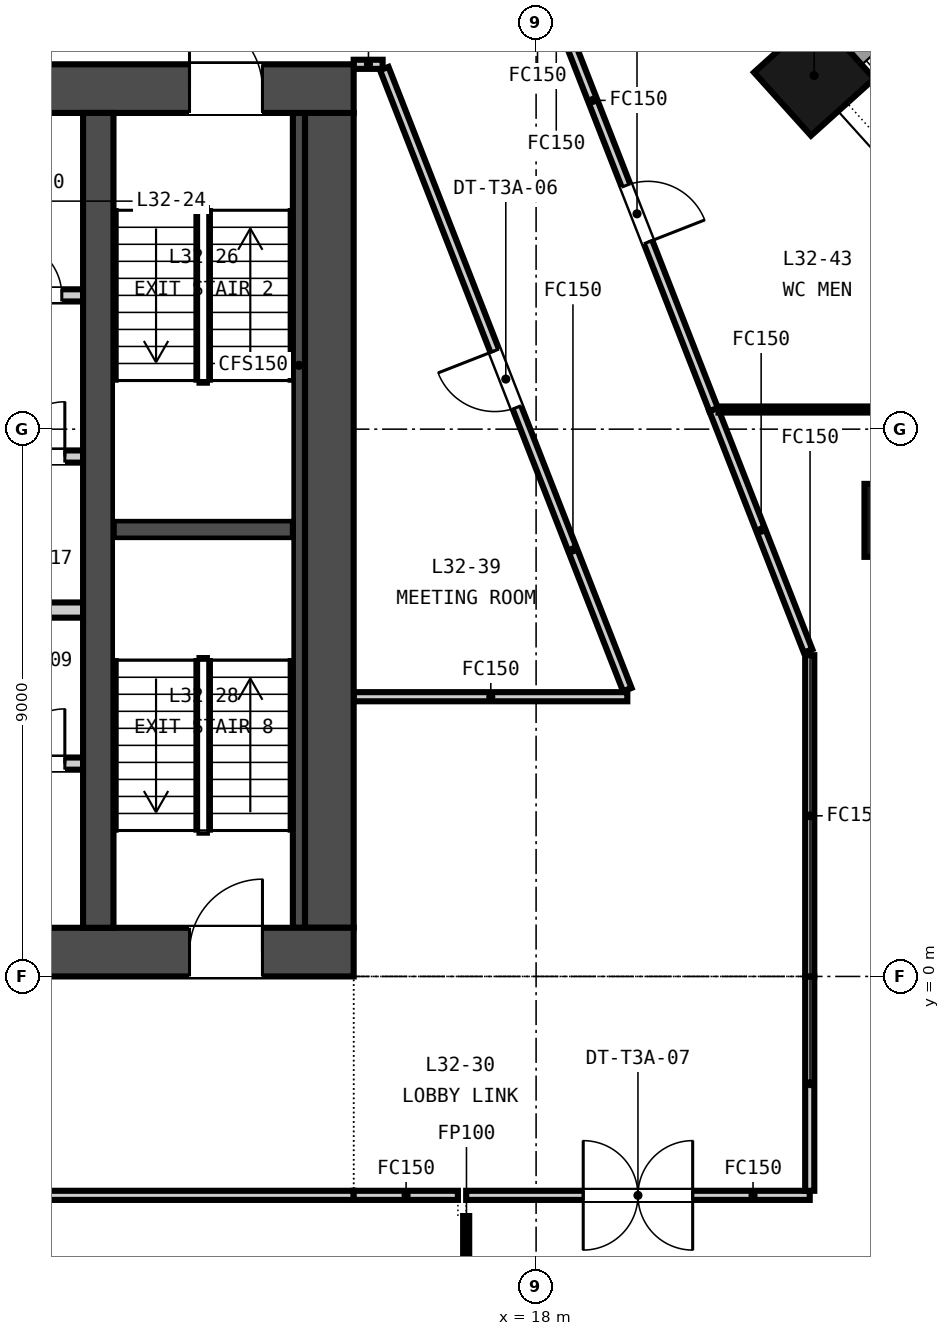
"""IFC4 building model, lengths in metres.
Left out: names, types, materials, properties, quantities, classifications, styles, units other than length and angle.
Written with IfcOpenShell. Run it as: python <this file> out.ifc"""

import sys

from ifc_helpers import new_model, si_unit, direction, frame, frame_2d, origin, origin_2d, place, context, subcontext, project, spatial, rectangle, extrude, element, fill, save


model = new_model("IFC4")
c1 = context("Model", 3, precision=1e-05, world=origin(), true_north=direction((0.0, 1.0)))
c2 = subcontext(c1, "Body", "Model", "MODEL_VIEW")
j1 = project(units=[si_unit("LENGTHUNIT", "METRE"), si_unit("PLANEANGLEUNIT", "RADIAN")], contexts=[c1])
p1 = place(None, origin())
s1 = spatial("IfcSite", under=j1, at=p1, CompositionType="ELEMENT")
p2 = place(p1, origin())
s2 = spatial("IfcBuilding", under=s1, at=p2, CompositionType="ELEMENT")
p3 = place(p2, frame((0.0, 0.0, 133.45)))
s3 = spatial("IfcBuildingStorey", under=s2, at=p3, CompositionType="ELEMENT", Elevation=133.45)
p4 = place(p3, frame((-15.0, 0.4, -0.15), z_axis=(0.0, 0.0, 1.0), x_axis=(1.0, 0.0, 0.0)))
e1 = element("IfcWall", 1, at=p4, inside=s3, PredefinedType="SOLIDWALL", context=c2, shape_type="SweptSolid", body=[
    extrude(rectangle(XDim=30.0, YDim=0.8, at=frame_2d((15.0, 0.0))), origin(), (0.0, 0.0, 1.0), 3.65),
])
p5 = place(p4, frame((5.8, 0.0, 0.15)))
e2 = element("IfcOpeningElement", 2, at=p5, cuts=e1, PredefinedType="OPENING", context=c2, shape_type="SweptSolid", body=[
    extrude(rectangle(XDim=2.4, YDim=2.4, at=frame_2d((1.2, 1.2))), frame((0.0, 0.41, 0.0), z_axis=(0.0, -1.0, 0.0), x_axis=(1.0, 0.0, 0.0)), (0.0, 0.0, 1.0), 0.82),
])
p6 = place(p4, frame((13.8, 0.0, 0.15)))
e3 = element("IfcOpeningElement", 3, at=p6, cuts=e1, PredefinedType="OPENING", context=c2, shape_type="SweptSolid", body=[
    extrude(rectangle(XDim=2.4, YDim=2.4, at=frame_2d((1.2, 1.2))), frame((0.0, 0.41, 0.0), z_axis=(0.0, -1.0, 0.0), x_axis=(1.0, 0.0, 0.0)), (0.0, 0.0, 1.0), 0.82),
])
p7 = place(p4, frame((21.8, 0.0, 0.15)))
e4 = element("IfcOpeningElement", 4, at=p7, cuts=e1, PredefinedType="OPENING", context=c2, shape_type="SweptSolid", body=[
    extrude(rectangle(XDim=2.4, YDim=2.4, at=frame_2d((1.2, 1.2))), frame((0.0, 0.41, 0.0), z_axis=(0.0, -1.0, 0.0), x_axis=(1.0, 0.0, 0.0)), (0.0, 0.0, 1.0), 0.82),
])
p8 = place(p4, frame((1.5, 0.0, 0.15)))
e5 = element("IfcOpeningElement", 5, at=p8, cuts=e1, PredefinedType="OPENING", context=c2, shape_type="SweptSolid", body=[
    extrude(rectangle(XDim=1.2, YDim=2.1, at=frame_2d((0.6, 1.05))), frame((0.0, 0.41, 0.0), z_axis=(0.0, -1.0, 0.0), x_axis=(1.0, 0.0, 0.0)), (0.0, 0.0, 1.0), 0.82),
])
p9 = place(p4, frame((27.3, 0.0, 0.15)))
e6 = element("IfcOpeningElement", 6, at=p9, cuts=e1, PredefinedType="OPENING", context=c2, shape_type="SweptSolid", body=[
    extrude(rectangle(XDim=1.2, YDim=2.1, at=frame_2d((0.6, 1.05))), frame((0.0, 0.41, 0.0), z_axis=(0.0, -1.0, 0.0), x_axis=(1.0, 0.0, 0.0)), (0.0, 0.0, 1.0), 0.82),
])
p10 = place(p3, frame((-15.0, 14.6, -0.15), z_axis=(0.0, 0.0, 1.0), x_axis=(1.0, 0.0, 0.0)))
e7 = element("IfcWall", 7, at=p10, inside=s3, PredefinedType="SOLIDWALL", context=c2, shape_type="SweptSolid", body=[
    extrude(rectangle(XDim=30.0, YDim=0.8, at=frame_2d((15.0, 0.0))), origin(), (0.0, 0.0, 1.0), 3.65),
])
p11 = place(p10, frame((9.25, 0.0, 0.15)))
e8 = element("IfcOpeningElement", 8, at=p11, cuts=e7, PredefinedType="OPENING", context=c2, shape_type="SweptSolid", body=[
    extrude(rectangle(XDim=1.5, YDim=2.1, at=frame_2d((0.75, 1.05))), frame((0.0, 0.41, 0.0), z_axis=(0.0, -1.0, 0.0), x_axis=(1.0, 0.0, 0.0)), (0.0, 0.0, 1.0), 0.82),
])
p12 = place(p10, frame((19.4, 0.0, 0.15)))
e9 = element("IfcOpeningElement", 9, at=p12, cuts=e7, PredefinedType="OPENING", context=c2, shape_type="SweptSolid", body=[
    extrude(rectangle(XDim=1.5, YDim=2.1, at=frame_2d((0.75, 1.05))), frame((0.0, 0.41, 0.0), z_axis=(0.0, -1.0, 0.0), x_axis=(1.0, 0.0, 0.0)), (0.0, 0.0, 1.0), 0.82),
])
p13 = place(p10, frame((1.5, 0.0, 0.15)))
e10 = element("IfcOpeningElement", 10, at=p13, cuts=e7, PredefinedType="OPENING", context=c2, shape_type="SweptSolid", body=[
    extrude(rectangle(XDim=1.2, YDim=2.1, at=frame_2d((0.6, 1.05))), frame((0.0, 0.41, 0.0), z_axis=(0.0, -1.0, 0.0), x_axis=(1.0, 0.0, 0.0)), (0.0, 0.0, 1.0), 0.82),
])
p14 = place(p10, frame((27.3, 0.0, 0.15)))
e11 = element("IfcOpeningElement", 11, at=p14, cuts=e7, PredefinedType="OPENING", context=c2, shape_type="SweptSolid", body=[
    extrude(rectangle(XDim=1.2, YDim=2.1, at=frame_2d((0.6, 1.05))), frame((0.0, 0.41, 0.0), z_axis=(0.0, -1.0, 0.0), x_axis=(1.0, 0.0, 0.0)), (0.0, 0.0, 1.0), 0.82),
])
p15 = place(p3, frame((14.6, 0.8, -0.15), z_axis=(0.0, 0.0, 1.0), x_axis=(0.0, 1.0, 0.0)))
e12 = element("IfcWall", 12, at=p15, inside=s3, PredefinedType="SOLIDWALL", context=c2, shape_type="SweptSolid", body=[
    extrude(rectangle(XDim=13.4, YDim=0.8, at=frame_2d((6.7, 0.0))), origin(), (0.0, 0.0, 1.0), 3.65),
])
p16 = place(p3, frame((10.8, 0.8, -0.15), z_axis=(0.0, 0.0, 1.0), x_axis=(0.0, 1.0, 0.0)))
e13 = element("IfcWall", 13, at=p16, inside=s3, PredefinedType="SOLIDWALL", context=c2, shape_type="SweptSolid", body=[
    extrude(rectangle(XDim=13.4, YDim=0.5, at=frame_2d((6.7, 0.0))), origin(), (0.0, 0.0, 1.0), 3.65),
])
p17 = place(p3, frame((22.573, 14.816, -0.15), z_axis=(0.0, 0.0, 1.0), x_axis=(-0.669130606359, 0.743144825477, 0.0)))
e14 = element("IfcColumn", 14, at=p17, inside=s3, PredefinedType="COLUMN", context=c2, shape_type="SweptSolid", body=[
    extrude(rectangle(XDim=1.4, YDim=1.4, at=origin_2d()), origin(), (0.0, 0.0, 1.0), 3.65),
])
p18 = place(p3, frame((24.0, 7.5, -0.15), z_axis=(0.0, 0.0, 1.0), x_axis=(1.0, 0.0, 0.0)))
e15 = element("IfcColumn", 15, at=p18, inside=s3, PredefinedType="COLUMN", context=c2, shape_type="SweptSolid", body=[
    extrude(rectangle(XDim=1.2, YDim=1.2, at=origin_2d()), origin(), (0.0, 0.0, 1.0), 3.65),
])
p19 = place(p3, frame((-10.55, 3.5, 0.0), z_axis=(0.0, 0.0, 1.0), x_axis=(1.0, 0.0, 0.0)))
e16 = element("IfcWall", 16, at=p19, inside=s3, PredefinedType="PARTITIONING", context=c2, shape_type="SweptSolid", body=[
    extrude(rectangle(XDim=21.1, YDim=0.2, at=frame_2d((10.55, 0.0))), origin(), (0.0, 0.0, 1.0), 3.5),
])
p20 = place(p19, frame((2.312, 0.0, 0.0)))
e17 = element("IfcOpeningElement", 17, at=p20, cuts=e16, PredefinedType="OPENING", context=c2, shape_type="SweptSolid", body=[
    extrude(rectangle(XDim=1.0, YDim=2.1, at=frame_2d((0.5, 1.05))), frame((0.0, 0.11, 0.0), z_axis=(0.0, -1.0, 0.0), x_axis=(1.0, 0.0, 0.0)), (0.0, 0.0, 1.0), 0.22),
])
p21 = place(p19, frame((7.05, 0.0, 0.0)))
e18 = element("IfcOpeningElement", 18, at=p21, cuts=e16, PredefinedType="OPENING", context=c2, shape_type="SweptSolid", body=[
    extrude(rectangle(XDim=1.0, YDim=2.1, at=frame_2d((0.5, 1.05))), frame((0.0, 0.11, 0.0), z_axis=(0.0, -1.0, 0.0), x_axis=(1.0, 0.0, 0.0)), (0.0, 0.0, 1.0), 0.22),
])
p22 = place(p19, frame((10.175, 0.0, 0.0)))
e19 = element("IfcOpeningElement", 19, at=p22, cuts=e16, PredefinedType="OPENING", context=c2, shape_type="SweptSolid", body=[
    extrude(rectangle(XDim=1.0, YDim=2.1, at=frame_2d((0.5, 1.05))), frame((0.0, 0.11, 0.0), z_axis=(0.0, -1.0, 0.0), x_axis=(1.0, 0.0, 0.0)), (0.0, 0.0, 1.0), 0.22),
])
p23 = place(p19, frame((14.05, 0.0, 0.0)))
e20 = element("IfcOpeningElement", 20, at=p23, cuts=e16, PredefinedType="OPENING", context=c2, shape_type="SweptSolid", body=[
    extrude(rectangle(XDim=1.0, YDim=2.1, at=frame_2d((0.5, 1.05))), frame((0.0, 0.11, 0.0), z_axis=(0.0, -1.0, 0.0), x_axis=(1.0, 0.0, 0.0)), (0.0, 0.0, 1.0), 0.22),
])
p24 = place(p19, frame((17.837, 0.0, 0.0)))
e21 = element("IfcOpeningElement", 21, at=p24, cuts=e16, PredefinedType="OPENING", context=c2, shape_type="SweptSolid", body=[
    extrude(rectangle(XDim=0.9, YDim=2.1, at=frame_2d((0.45, 1.05))), frame((0.0, 0.11, 0.0), z_axis=(0.0, -1.0, 0.0), x_axis=(1.0, 0.0, 0.0)), (0.0, 0.0, 1.0), 0.22),
])
p25 = place(p19, frame((19.9, 0.0, 0.0)))
e22 = element("IfcOpeningElement", 22, at=p25, cuts=e16, PredefinedType="OPENING", context=c2, shape_type="SweptSolid", body=[
    extrude(rectangle(XDim=0.9, YDim=2.1, at=frame_2d((0.45, 1.05))), frame((0.0, 0.11, 0.0), z_axis=(0.0, -1.0, 0.0), x_axis=(1.0, 0.0, 0.0)), (0.0, 0.0, 1.0), 0.22),
])
p26 = place(p3, frame((-10.55, 6.025, 0.0), z_axis=(0.0, 0.0, 1.0), x_axis=(1.0, 0.0, 0.0)))
e23 = element("IfcWall", 23, at=p26, inside=s3, PredefinedType="PARTITIONING", context=c2, shape_type="SweptSolid", body=[
    extrude(rectangle(XDim=21.1, YDim=0.25, at=frame_2d((10.55, 0.0))), origin(), (0.0, 0.0, 1.0), 3.5),
])
p27 = place(p3, frame((-10.55, 8.55, 0.0), z_axis=(0.0, 0.0, 1.0), x_axis=(1.0, 0.0, 0.0)))
e24 = element("IfcWall", 24, at=p27, inside=s3, PredefinedType="PARTITIONING", context=c2, shape_type="SweptSolid", body=[
    extrude(rectangle(XDim=21.1, YDim=0.2, at=frame_2d((10.55, 0.0))), origin(), (0.0, 0.0, 1.0), 3.5),
])
p28 = place(p27, frame((0.675, 0.0, 0.0)))
e25 = element("IfcOpeningElement", 25, at=p28, cuts=e24, PredefinedType="OPENING", context=c2, shape_type="SweptSolid", body=[
    extrude(rectangle(XDim=1.2, YDim=2.1, at=frame_2d((0.6, 1.05))), frame((0.0, 0.11, 0.0), z_axis=(0.0, -1.0, 0.0), x_axis=(1.0, 0.0, 0.0)), (0.0, 0.0, 1.0), 0.22),
])
p29 = place(p27, frame((3.475, 0.0, 0.0)))
e26 = element("IfcOpeningElement", 26, at=p29, cuts=e24, PredefinedType="OPENING", context=c2, shape_type="SweptSolid", body=[
    extrude(rectangle(XDim=1.2, YDim=2.1, at=frame_2d((0.6, 1.05))), frame((0.0, 0.11, 0.0), z_axis=(0.0, -1.0, 0.0), x_axis=(1.0, 0.0, 0.0)), (0.0, 0.0, 1.0), 0.22),
])
p30 = place(p27, frame((6.275, 0.0, 0.0)))
e27 = element("IfcOpeningElement", 27, at=p30, cuts=e24, PredefinedType="OPENING", context=c2, shape_type="SweptSolid", body=[
    extrude(rectangle(XDim=1.2, YDim=2.1, at=frame_2d((0.6, 1.05))), frame((0.0, 0.11, 0.0), z_axis=(0.0, -1.0, 0.0), x_axis=(1.0, 0.0, 0.0)), (0.0, 0.0, 1.0), 0.22),
])
p31 = place(p27, frame((9.075, 0.0, 0.0)))
e28 = element("IfcOpeningElement", 28, at=p31, cuts=e24, PredefinedType="OPENING", context=c2, shape_type="SweptSolid", body=[
    extrude(rectangle(XDim=1.2, YDim=2.1, at=frame_2d((0.6, 1.05))), frame((0.0, 0.11, 0.0), z_axis=(0.0, -1.0, 0.0), x_axis=(1.0, 0.0, 0.0)), (0.0, 0.0, 1.0), 0.22),
])
p32 = place(p27, frame((11.875, 0.0, 0.0)))
e29 = element("IfcOpeningElement", 29, at=p32, cuts=e24, PredefinedType="OPENING", context=c2, shape_type="SweptSolid", body=[
    extrude(rectangle(XDim=1.2, YDim=2.1, at=frame_2d((0.6, 1.05))), frame((0.0, 0.11, 0.0), z_axis=(0.0, -1.0, 0.0), x_axis=(1.0, 0.0, 0.0)), (0.0, 0.0, 1.0), 0.22),
])
p33 = place(p27, frame((14.675, 0.0, 0.0)))
e30 = element("IfcOpeningElement", 30, at=p33, cuts=e24, PredefinedType="OPENING", context=c2, shape_type="SweptSolid", body=[
    extrude(rectangle(XDim=1.2, YDim=2.1, at=frame_2d((0.6, 1.05))), frame((0.0, 0.11, 0.0), z_axis=(0.0, -1.0, 0.0), x_axis=(1.0, 0.0, 0.0)), (0.0, 0.0, 1.0), 0.22),
])
p34 = place(p27, frame((17.475, 0.0, 0.0)))
e31 = element("IfcOpeningElement", 31, at=p34, cuts=e24, PredefinedType="OPENING", context=c2, shape_type="SweptSolid", body=[
    extrude(rectangle(XDim=1.2, YDim=2.1, at=frame_2d((0.6, 1.05))), frame((0.0, 0.11, 0.0), z_axis=(0.0, -1.0, 0.0), x_axis=(1.0, 0.0, 0.0)), (0.0, 0.0, 1.0), 0.22),
])
p35 = place(p27, frame((19.9, 0.0, 0.0)))
e32 = element("IfcOpeningElement", 32, at=p35, cuts=e24, PredefinedType="OPENING", context=c2, shape_type="SweptSolid", body=[
    extrude(rectangle(XDim=0.9, YDim=2.1, at=frame_2d((0.45, 1.05))), frame((0.0, 0.11, 0.0), z_axis=(0.0, -1.0, 0.0), x_axis=(1.0, 0.0, 0.0)), (0.0, 0.0, 1.0), 0.22),
])
p36 = place(p3, frame((5.9, 11.2, 0.0), z_axis=(0.0, 0.0, 1.0), x_axis=(1.0, 0.0, 0.0)))
e33 = element("IfcWall", 33, at=p36, inside=s3, PredefinedType="PARTITIONING", context=c2, shape_type="SweptSolid", body=[
    extrude(rectangle(XDim=4.65, YDim=0.2, at=frame_2d((2.325, 0.0))), origin(), (0.0, 0.0, 1.0), 3.5),
])
p37 = place(p36, frame((3.4, 0.0, 0.0)))
e34 = element("IfcOpeningElement", 34, at=p37, cuts=e33, PredefinedType="OPENING", context=c2, shape_type="SweptSolid", body=[
    extrude(rectangle(XDim=0.9, YDim=2.1, at=frame_2d((0.45, 1.05))), frame((0.0, 0.11, 0.0), z_axis=(0.0, -1.0, 0.0), x_axis=(1.0, 0.0, 0.0)), (0.0, 0.0, 1.0), 0.22),
])
p38 = place(p3, frame((11.05, 7.35, 0.0), z_axis=(0.0, 0.0, 1.0), x_axis=(1.0, 0.0, 0.0)))
e35 = element("IfcWall", 35, at=p38, inside=s3, PredefinedType="SOLIDWALL", context=c2, shape_type="SweptSolid", body=[
    extrude(rectangle(XDim=2.95, YDim=0.3, at=frame_2d((1.475, 0.0))), origin(), (0.0, 0.0, 1.0), 3.5),
])
p39 = place(p3, frame((14.1, 0.8, 0.0), z_axis=(0.0, 0.0, 1.0), x_axis=(0.0, 1.0, 0.0)))
e36 = element("IfcWall", 36, at=p39, inside=s3, PredefinedType="SOLIDWALL", context=c2, shape_type="SweptSolid", body=[
    extrude(rectangle(XDim=13.4, YDim=0.2, at=frame_2d((6.7, 0.0))), origin(), (0.0, 0.0, 1.0), 3.5),
])
p40 = place(p3, frame((15.0, -3.6, 0.0), z_axis=(0.0, 0.0, 1.0), x_axis=(-1.0, 0.0, 0.0)))
e37 = element("IfcWall", 37, at=p40, inside=s3, PredefinedType="PARTITIONING", context=c2, shape_type="SweptSolid", body=[
    extrude(rectangle(XDim=30.0, YDim=0.15, at=frame_2d((15.0, 0.0))), origin(), (0.0, 0.0, 1.0), 2.741),
])
p41 = place(p40, frame((14.1, 0.0, 0.0)))
e38 = element("IfcOpeningElement", 38, at=p41, cuts=e37, PredefinedType="OPENING", context=c2, shape_type="SweptSolid", body=[
    extrude(rectangle(XDim=1.8, YDim=2.1, at=frame_2d((0.9, 1.05))), frame((0.0, 0.085, 0.0), z_axis=(0.0, -1.0, 0.0), x_axis=(1.0, 0.0, 0.0)), (0.0, 0.0, 1.0), 0.17),
])
p42 = place(p3, frame((22.5, -3.6, 0.0), z_axis=(0.0, 0.0, 1.0), x_axis=(-1.0, 0.0, 0.0)))
e39 = element("IfcWall", 39, at=p42, inside=s3, PredefinedType="PARTITIONING", context=c2, shape_type="SweptSolid", body=[
    extrude(rectangle(XDim=5.65, YDim=0.15, at=frame_2d((2.825, 0.0))), origin(), (0.0, 0.0, 1.0), 2.741),
])
p43 = place(p42, frame((1.925, 0.0, 0.0)))
e40 = element("IfcOpeningElement", 40, at=p43, cuts=e39, PredefinedType="OPENING", context=c2, shape_type="SweptSolid", body=[
    extrude(rectangle(XDim=1.8, YDim=2.1, at=frame_2d((0.9, 1.05))), frame((0.0, 0.085, 0.0), z_axis=(0.0, -1.0, 0.0), x_axis=(1.0, 0.0, 0.0)), (0.0, 0.0, 1.0), 0.17),
])
p44 = place(p3, frame((22.5, 0.0, 0.0), z_axis=(0.0, 0.0, 1.0), x_axis=(0.0, -1.0, 0.0)))
e41 = element("IfcWall", 41, at=p44, inside=s3, PredefinedType="PARTITIONING", context=c2, shape_type="SweptSolid", body=[
    extrude(rectangle(XDim=3.525, YDim=0.15, at=frame_2d((1.762, 0.0))), origin(), (0.0, 0.0, 1.0), 2.741),
])
p45 = place(p3, frame((16.714, -3.6, 0.0), z_axis=(0.0, 0.0, 1.0), x_axis=(-1.0, 0.0, 0.0)))
e42 = element("IfcWall", 42, at=p45, inside=s3, PredefinedType="PARTITIONING", context=c2, shape_type="SweptSolid", body=[
    extrude(rectangle(XDim=1.714, YDim=0.15, at=frame_2d((0.857, 0.0))), origin(), (0.0, 0.0, 1.0), 2.741),
])
p46 = place(p3, frame((15.476, 15.0, 0.0), z_axis=(0.0, 0.0, 1.0), x_axis=(-1.0, 0.0, 0.0)))
e43 = element("IfcWall", 43, at=p46, inside=s3, PredefinedType="PARTITIONING", context=c2, shape_type="SweptSolid", body=[
    extrude(rectangle(XDim=0.476, YDim=0.15, at=frame_2d((0.238, 0.0))), origin(), (0.0, 0.0, 1.0), 2.741),
])
p47 = place(p3, frame((19.5, 4.717, 0.0), z_axis=(0.0, 0.0, 1.0), x_axis=(-0.364410260026, 0.931238509936, 0.0)))
e44 = element("IfcWall", 44, at=p47, inside=s3, PredefinedType="PARTITIONING", context=c2, shape_type="SweptSolid", body=[
    extrude(rectangle(XDim=10.967, YDim=0.15, at=frame_2d((5.484, 0.0))), origin(), (0.0, 0.0, 1.0), 2.741),
])
p48 = place(p47, frame((4.984, 0.0, 0.0)))
e45 = element("IfcOpeningElement", 45, at=p48, cuts=e44, PredefinedType="OPENING", context=c2, shape_type="SweptSolid", body=[
    extrude(rectangle(XDim=1.0, YDim=2.1, at=frame_2d((0.5, 1.05))), frame((0.0, 0.085, 0.0), z_axis=(0.0, -1.0, 0.0), x_axis=(1.0, 0.0, 0.0)), (0.0, 0.0, 1.0), 0.17),
])
p49 = place(p3, frame((22.5, 5.283, 0.0), z_axis=(0.0, 0.0, 1.0), x_axis=(0.0, -1.0, 0.0)))
e46 = element("IfcWall", 46, at=p49, inside=s3, PredefinedType="PARTITIONING", context=c2, shape_type="SweptSolid", body=[
    extrude(rectangle(XDim=5.283, YDim=0.15, at=frame_2d((2.642, 0.0))), origin(), (0.0, 0.0, 1.0), 2.741),
])
p50 = place(p3, frame((15.0, 4.6, 0.0), z_axis=(0.0, 0.0, 1.0), x_axis=(1.0, 0.0, 0.0)))
e47 = element("IfcWall", 47, at=p50, inside=s3, PredefinedType="PARTITIONING", context=c2, shape_type="SweptSolid", body=[
    extrude(rectangle(XDim=4.5, YDim=0.15, at=frame_2d((2.25, 0.0))), origin(), (0.0, 0.0, 1.0), 2.741),
])
p51 = place(p3, frame((20.919, 9.323, 0.0), z_axis=(0.0, 0.0, 1.0), x_axis=(0.364429576393, -0.931230950865, 0.0)))
e48 = element("IfcWall", 48, at=p51, inside=s3, PredefinedType="PARTITIONING", context=c2, shape_type="SweptSolid", body=[
    extrude(rectangle(XDim=4.263, YDim=0.15, at=frame_2d((2.132, 0.0))), origin(), (0.0, 0.0, 1.0), 2.741),
])
p52 = place(p3, frame((16.85, -9.736, 0.0), z_axis=(0.0, 0.0, 1.0), x_axis=(0.0, 1.0, 0.0)))
e49 = element("IfcWall", 49, at=p52, inside=s3, PredefinedType="PARTITIONING", context=c2, shape_type="SweptSolid", body=[
    extrude(rectangle(XDim=5.796, YDim=0.1, at=frame_2d((2.898, 0.0))), origin(), (0.0, 0.0, 1.0), 2.741),
])
p53 = place(p3, frame((18.4, 15.76, 0.0), z_axis=(0.0, 0.0, 1.0), x_axis=(0.364425982763, -0.931232357195, 0.0)))
e50 = element("IfcWall", 50, at=p53, inside=s3, PredefinedType="PARTITIONING", context=c2, shape_type="SweptSolid", body=[
    extrude(rectangle(XDim=6.912, YDim=0.15, at=frame_2d((3.456, 0.0))), origin(), (0.0, 0.0, 1.0), 2.741),
])
p54 = place(p53, frame((2.956, 0.0, 0.0)))
e51 = element("IfcOpeningElement", 51, at=p54, cuts=e50, PredefinedType="OPENING", context=c2, shape_type="SweptSolid", body=[
    extrude(rectangle(XDim=1.0, YDim=2.1, at=frame_2d((0.5, 1.05))), frame((0.0, 0.085, 0.0), z_axis=(0.0, -1.0, 0.0), x_axis=(1.0, 0.0, 0.0)), (0.0, 0.0, 1.0), 0.17),
])
p55 = place(p3, frame((21.0, 9.323, 0.0), z_axis=(0.0, 0.0, 1.0), x_axis=(1.0, 0.0, 0.0)))
e52 = element("IfcWall", 52, at=p55, inside=s3, PredefinedType="PARTITIONING", context=c2, shape_type="SweptSolid", body=[
    extrude(rectangle(XDim=6.653, YDim=0.1, at=frame_2d((3.326, 0.0))), origin(), (0.0, 0.0, 1.0), 2.741),
])
p56 = place(p25, origin())
e53 = element("IfcDoor", 53, at=p56, inside=s3, OperationType="SINGLE_SWING_RIGHT", PredefinedType="DOOR", context=c2, shape_type="SweptSolid", body=[
    extrude(rectangle(XDim=0.9, YDim=2.1, at=frame_2d((0.45, 1.05))), frame((0.0, 0.025, 0.0), z_axis=(0.0, -1.0, 0.0), x_axis=(1.0, 0.0, 0.0)), (0.0, 0.0, 1.0), 0.05),
])
fill(e22, e53)
p57 = place(p35, origin())
e54 = element("IfcDoor", 54, at=p57, inside=s3, OperationType="SINGLE_SWING_RIGHT", PredefinedType="DOOR", context=c2, shape_type="SweptSolid", body=[
    extrude(rectangle(XDim=0.9, YDim=2.1, at=frame_2d((0.45, 1.05))), frame((0.0, 0.025, 0.0), z_axis=(0.0, -1.0, 0.0), x_axis=(1.0, 0.0, 0.0)), (0.0, 0.0, 1.0), 0.05),
])
fill(e32, e54)
p58 = place(p37, origin())
e55 = element("IfcDoor", 55, at=p58, inside=s3, OperationType="SINGLE_SWING_LEFT", PredefinedType="DOOR", context=c2, shape_type="SweptSolid", body=[
    extrude(rectangle(XDim=0.9, YDim=2.1, at=frame_2d((0.45, 1.05))), frame((0.0, 0.025, 0.0), z_axis=(0.0, -1.0, 0.0), x_axis=(1.0, 0.0, 0.0)), (0.0, 0.0, 1.0), 0.05),
])
fill(e34, e55)
p59 = place(p14, origin())
e56 = element("IfcDoor", 56, at=p59, inside=s3, OperationType="SINGLE_SWING_LEFT", PredefinedType="DOOR", context=c2, shape_type="SweptSolid", body=[
    extrude(rectangle(XDim=1.2, YDim=2.1, at=frame_2d((0.6, 1.05))), frame((0.0, 0.025, 0.0), z_axis=(0.0, -1.0, 0.0), x_axis=(1.0, 0.0, 0.0)), (0.0, 0.0, 1.0), 0.05),
])
fill(e11, e56)
p60 = place(p9, origin())
e57 = element("IfcDoor", 57, at=p60, inside=s3, OperationType="SINGLE_SWING_RIGHT", PredefinedType="DOOR", context=c2, shape_type="SweptSolid", body=[
    extrude(rectangle(XDim=1.2, YDim=2.1, at=frame_2d((0.6, 1.05))), frame((0.0, 0.025, 0.0), z_axis=(0.0, -1.0, 0.0), x_axis=(1.0, 0.0, 0.0)), (0.0, 0.0, 1.0), 0.05),
])
fill(e6, e57)
p61 = place(p48, origin())
e58 = element("IfcDoor", 58, at=p61, inside=s3, OperationType="SINGLE_SWING_RIGHT", PredefinedType="DOOR", context=c2, shape_type="SweptSolid", body=[
    extrude(rectangle(XDim=1.0, YDim=2.1, at=frame_2d((0.5, 1.05))), frame((0.0, 0.025, 0.0), z_axis=(0.0, -1.0, 0.0), x_axis=(1.0, 0.0, 0.0)), (0.0, 0.0, 1.0), 0.05),
])
fill(e45, e58)
p62 = place(p43, origin())
e59 = element("IfcDoor", 59, at=p62, inside=s3, OperationType="DOUBLE_DOOR_DOUBLE_SWING", PredefinedType="DOOR", context=c2, shape_type="SweptSolid", body=[
    extrude(rectangle(XDim=1.8, YDim=2.1, at=frame_2d((0.9, 1.05))), frame((0.0, 0.025, 0.0), z_axis=(0.0, -1.0, 0.0), x_axis=(1.0, 0.0, 0.0)), (0.0, 0.0, 1.0), 0.05),
])
fill(e40, e59)
p63 = place(p54, origin())
e60 = element("IfcDoor", 60, at=p63, inside=s3, OperationType="SINGLE_SWING_RIGHT", PredefinedType="DOOR", context=c2, shape_type="SweptSolid", body=[
    extrude(rectangle(XDim=1.0, YDim=2.1, at=frame_2d((0.5, 1.05))), frame((0.0, 0.025, 0.0), z_axis=(0.0, -1.0, 0.0), x_axis=(1.0, 0.0, 0.0)), (0.0, 0.0, 1.0), 0.05),
])
fill(e51, e60)
save(model, sys.argv[1])
